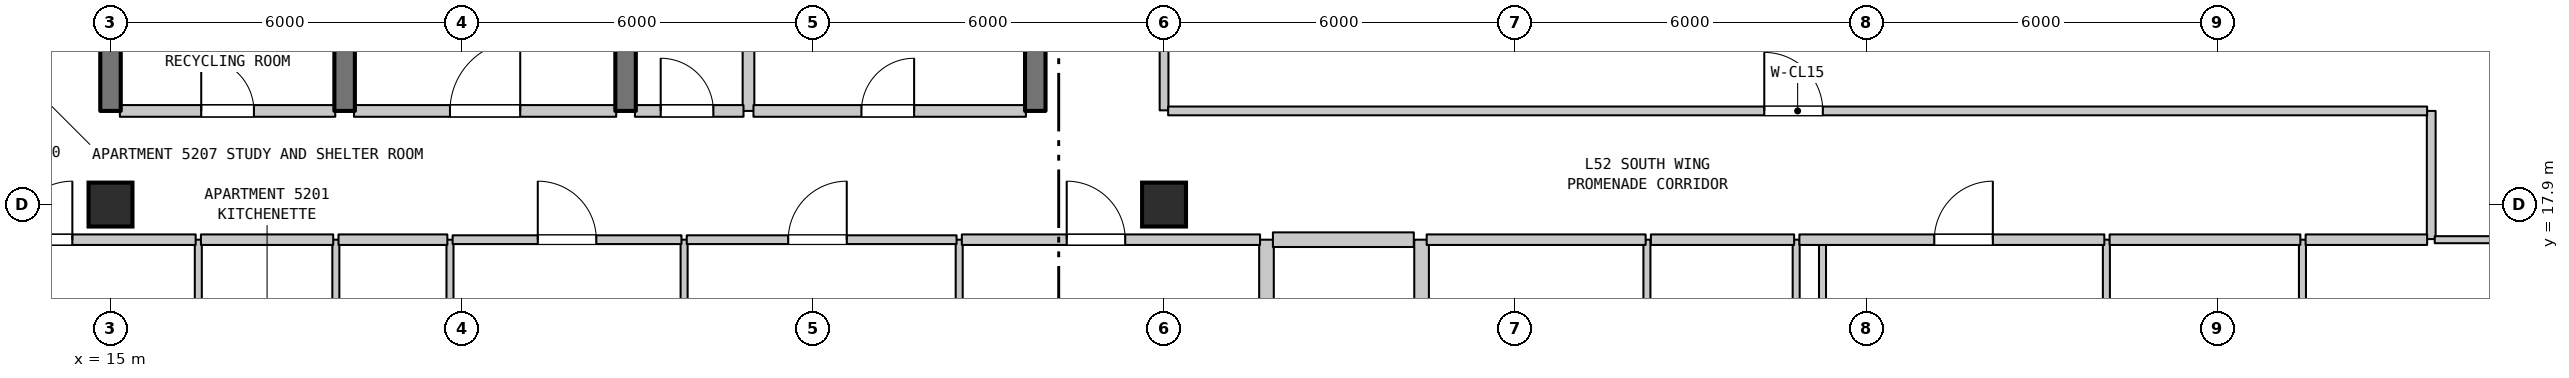
"""IFC4 building model, lengths in metres.
Left out: names, types, materials, properties, quantities, classifications, styles, units other than length and angle.
Written with IfcOpenShell. Run it as: python <this file> out.ifc"""

import sys

from ifc_helpers import new_model, si_unit, direction, frame, frame_2d, origin, origin_2d, place, context, subcontext, project, spatial, rectangle, extrude, element, fill, save


model = new_model("IFC4")
c1 = context("Model", 3, precision=1e-05, world=origin(), true_north=direction((0.0, 1.0)))
c2 = subcontext(c1, "Body", "Model", "MODEL_VIEW")
j1 = project(units=[si_unit("LENGTHUNIT", "METRE"), si_unit("PLANEANGLEUNIT", "RADIAN")], contexts=[c1])
p1 = place(None, origin())
s1 = spatial("IfcSite", under=j1, at=p1, CompositionType="ELEMENT")
p2 = place(p1, origin())
s2 = spatial("IfcBuilding", under=s1, at=p2, CompositionType="ELEMENT")
p3 = place(p2, frame((0.0, 0.0, 210.6)))
s3 = spatial("IfcBuildingStorey", under=s2, at=p3, CompositionType="ELEMENT", Elevation=210.6)
for number, where, z_axis, x_axis in (
    (1, (15.0, 17.9, 0.0), (0.0, 0.0, 1.0), (1.0, 0.0, 0.0)),
    (2, (33.0, 17.9, 0.0), (0.0, 0.0, 1.0), (1.0, 0.0, 0.0)),
):
    element("IfcColumn", number, at=place(p3, frame(where, z_axis=z_axis, x_axis=x_axis)), inside=s3, PredefinedType="COLUMN", context=c2, shape_type="SweptSolid", body=[
        extrude(rectangle(XDim=0.75, YDim=0.75, at=origin_2d()), origin(), (0.0, 0.0, 1.0), 3.7),
    ])
p4 = place(p3, frame((15.0, 19.5, 0.0), z_axis=(0.0, 0.0, 1.0), x_axis=(0.0, 1.0, 0.0)))
e3 = element("IfcWall", 3, at=p4, inside=s3, PredefinedType="SHEAR", context=c2, shape_type="SweptSolid", body=[
    extrude(rectangle(XDim=3.2, YDim=0.35, at=frame_2d((1.6, 0.0))), origin(), (0.0, 0.0, 1.0), 3.39),
])
p5 = place(p3, frame((16.5, 14.1, 0.0), z_axis=(0.0, 0.0, 1.0), x_axis=(0.0, 1.0, 0.0)))
e4 = element("IfcWall", 4, at=p5, inside=s3, PredefinedType="PARTITIONING", context=c2, shape_type="SweptSolid", body=[
    extrude(rectangle(XDim=3.2, YDim=0.12, at=frame_2d((1.6, 0.0))), origin(), (0.0, 0.0, 1.0), 3.39),
])
p6 = place(p5, frame((1.15, 0.0, 0.0)))
e5 = element("IfcOpeningElement", 5, at=p6, cuts=e4, PredefinedType="OPENING", context=c2, shape_type="SweptSolid", body=[
    extrude(rectangle(XDim=0.9, YDim=2.15, at=frame_2d((0.45, 1.075))), frame((0.0, 0.07, 0.0), z_axis=(0.0, -1.0, 0.0), x_axis=(1.0, 0.0, 0.0)), (0.0, 0.0, 1.0), 0.14),
])
p7 = place(p3, frame((18.85, 14.1, 0.0), z_axis=(0.0, 0.0, 1.0), x_axis=(0.0, 1.0, 0.0)))
e6 = element("IfcWall", 6, at=p7, inside=s3, PredefinedType="PARTITIONING", context=c2, shape_type="SweptSolid", body=[
    extrude(rectangle(XDim=3.2, YDim=0.12, at=frame_2d((1.6, 0.0))), origin(), (0.0, 0.0, 1.0), 3.39),
])
p8 = place(p3, frame((19.0, 19.5, 0.0), z_axis=(0.0, 0.0, 1.0), x_axis=(0.0, 1.0, 0.0)))
e7 = element("IfcWall", 7, at=p8, inside=s3, PredefinedType="SHEAR", context=c2, shape_type="SweptSolid", body=[
    extrude(rectangle(XDim=3.2, YDim=0.35, at=frame_2d((1.6, 0.0))), origin(), (0.0, 0.0, 1.0), 3.39),
])
p9 = place(p3, frame((20.8, 6.888, 0.0), z_axis=(0.0, 0.0, 1.0), x_axis=(0.0, 1.0, 0.0)))
e8 = element("IfcWall", 8, at=p9, inside=s3, PredefinedType="PARTITIONING", context=c2, shape_type="SweptSolid", body=[
    extrude(rectangle(XDim=10.412, YDim=0.12, at=frame_2d((5.206, 0.0))), origin(), (0.0, 0.0, 1.0), 3.39),
])
p10 = place(p3, frame((23.8, 19.5, 0.0), z_axis=(0.0, 0.0, 1.0), x_axis=(0.0, 1.0, 0.0)))
e9 = element("IfcWall", 9, at=p10, inside=s3, PredefinedType="SHEAR", context=c2, shape_type="SweptSolid", body=[
    extrude(rectangle(XDim=3.2, YDim=0.35, at=frame_2d((1.6, 0.0))), origin(), (0.0, 0.0, 1.0), 3.39),
])
p11 = place(p3, frame((24.8, 0.71, 0.0), z_axis=(0.0, 0.0, 1.0), x_axis=(0.0, 1.0, 0.0)))
e10 = element("IfcWall", 10, at=p11, inside=s3, PredefinedType="PARTITIONING", context=c2, shape_type="SweptSolid", body=[
    extrude(rectangle(XDim=16.59, YDim=0.12, at=frame_2d((8.295, 0.0))), origin(), (0.0, 0.0, 1.0), 3.39),
])
p12 = place(p3, frame((25.9, 19.5, 0.0), z_axis=(0.0, 0.0, 1.0), x_axis=(0.0, 1.0, 0.0)))
e11 = element("IfcWall", 11, at=p12, inside=s3, PredefinedType="STANDARD", context=c2, shape_type="SweptSolid", body=[
    extrude(rectangle(XDim=3.2, YDim=0.2, at=frame_2d((1.6, 0.0))), origin(), (0.0, 0.0, 1.0), 3.39),
])
p13 = place(p3, frame((29.5, 14.85, 0.0), z_axis=(0.0, 0.0, 1.0), x_axis=(0.0, 1.0, 0.0)))
e12 = element("IfcWall", 12, at=p13, inside=s3, PredefinedType="PARTITIONING", context=c2, shape_type="SweptSolid", body=[
    extrude(rectangle(XDim=2.45, YDim=0.12, at=frame_2d((1.225, 0.0))), origin(), (0.0, 0.0, 1.0), 3.39),
])
p14 = place(p3, frame((30.8, 19.5, 0.0), z_axis=(0.0, 0.0, 1.0), x_axis=(0.0, 1.0, 0.0)))
e13 = element("IfcWall", 13, at=p14, inside=s3, PredefinedType="SHEAR", context=c2, shape_type="SweptSolid", body=[
    extrude(rectangle(XDim=3.2, YDim=0.35, at=frame_2d((1.6, 0.0))), origin(), (0.0, 0.0, 1.0), 3.39),
])
p15 = place(p3, frame((33.0, 19.51, 0.0), z_axis=(0.0, 0.0, 1.0), x_axis=(0.0, 1.0, 0.0)))
e14 = element("IfcWall", 14, at=p15, inside=s3, PredefinedType="STANDARD", context=c2, shape_type="SweptSolid", body=[
    extrude(rectangle(XDim=3.66, YDim=0.15, at=frame_2d((1.83, 0.0))), origin(), (0.0, 0.0, 1.0), 2.99),
])
p16 = place(p15, frame((1.258, 0.0, 0.0)))
e15 = element("IfcOpeningElement", 15, at=p16, cuts=e14, PredefinedType="OPENING", context=c2, shape_type="SweptSolid", body=[
    extrude(rectangle(XDim=1.0, YDim=2.15, at=frame_2d((0.5, 1.075))), frame((0.0, 0.085, 0.0), z_axis=(0.0, -1.0, 0.0), x_axis=(1.0, 0.0, 0.0)), (0.0, 0.0, 1.0), 0.17),
])
for number, where, z_axis, x_axis in (
    (16, (34.75, 11.15, 0.0), (0.0, 0.0, 1.0), (0.0, 1.0, 0.0)),
    (17, (37.4, 11.15, 0.0), (0.0, 0.0, 1.0), (0.0, 1.0, 0.0)),
):
    element("IfcWall", number, at=place(p3, frame(where, z_axis=z_axis, x_axis=x_axis)), inside=s3, PredefinedType="STANDARD", context=c2, shape_type="SweptSolid", body=[
        extrude(rectangle(XDim=6.15, YDim=0.25, at=frame_2d((3.075, 0.0))), origin(), (0.0, 0.0, 1.0), 3.39),
    ])
for number, where, z_axis, x_axis in (
    (18, (41.25, 11.15, 0.0), (0.0, 0.0, 1.0), (0.0, 1.0, 0.0)),
    (19, (43.8, 11.15, 0.0), (0.0, 0.0, 1.0), (0.0, 1.0, 0.0)),
):
    element("IfcWall", number, at=place(p3, frame(where, z_axis=z_axis, x_axis=x_axis)), inside=s3, PredefinedType="PARTITIONING", context=c2, shape_type="SweptSolid", body=[
        extrude(rectangle(XDim=6.15, YDim=0.12, at=frame_2d((3.075, 0.0))), origin(), (0.0, 0.0, 1.0), 3.39),
    ])
p17 = place(p3, frame((44.25, 14.85, 0.0), z_axis=(0.0, 0.0, 1.0), x_axis=(0.0, 1.0, 0.0)))
e20 = element("IfcWall", 20, at=p17, inside=s3, PredefinedType="PARTITIONING", context=c2, shape_type="SweptSolid", body=[
    extrude(rectangle(XDim=2.45, YDim=0.12, at=frame_2d((1.225, 0.0))), origin(), (0.0, 0.0, 1.0), 3.39),
])
for number, where, z_axis, x_axis in (
    (21, (49.1, 11.15, 0.0), (0.0, 0.0, 1.0), (0.0, 1.0, 0.0)),
    (22, (52.45, 11.15, 0.0), (0.0, 0.0, 1.0), (0.0, 1.0, 0.0)),
):
    element("IfcWall", number, at=place(p3, frame(where, z_axis=z_axis, x_axis=x_axis)), inside=s3, PredefinedType="PARTITIONING", context=c2, shape_type="SweptSolid", body=[
        extrude(rectangle(XDim=6.15, YDim=0.12, at=frame_2d((3.075, 0.0))), origin(), (0.0, 0.0, 1.0), 3.39),
    ])
p18 = place(p3, frame((54.65, 17.31, 0.0), z_axis=(0.0, 0.0, 1.0), x_axis=(0.0, 1.0, 0.0)))
e23 = element("IfcWall", 23, at=p18, inside=s3, PredefinedType="STANDARD", context=c2, shape_type="SweptSolid", body=[
    extrude(rectangle(XDim=2.19, YDim=0.15, at=frame_2d((1.095, 0.0))), origin(), (0.0, 0.0, 1.0), 3.39),
])
p19 = place(p3, frame((12.875, 17.3, 0.0), z_axis=(0.0, 0.0, 1.0), x_axis=(1.0, 0.0, 0.0)))
e24 = element("IfcWall", 24, at=p19, inside=s3, PredefinedType="STANDARD", context=c2, shape_type="SweptSolid", body=[
    extrude(rectangle(XDim=3.58, YDim=0.18, at=frame_2d((1.79, 0.0))), origin(), (0.0, 0.0, 1.0), 3.39),
])
p20 = place(p19, frame((0.473, 0.0, 0.0)))
e25 = element("IfcOpeningElement", 25, at=p20, cuts=e24, PredefinedType="OPENING", context=c2, shape_type="SweptSolid", body=[
    extrude(rectangle(XDim=1.0, YDim=2.15, at=frame_2d((0.5, 1.075))), frame((0.0, 0.1, 0.0), z_axis=(0.0, -1.0, 0.0), x_axis=(1.0, 0.0, 0.0)), (0.0, 0.0, 1.0), 0.2),
])
p21 = place(p3, frame((16.545, 17.3, 0.0), z_axis=(0.0, 0.0, 1.0), x_axis=(1.0, 0.0, 0.0)))
e26 = element("IfcWall", 26, at=p21, inside=s3, PredefinedType="STANDARD", context=c2, shape_type="SweptSolid", body=[
    extrude(rectangle(XDim=2.26, YDim=0.18, at=frame_2d((1.13, 0.0))), origin(), (0.0, 0.0, 1.0), 3.39),
])
p22 = place(p3, frame((18.895, 17.3, 0.0), z_axis=(0.0, 0.0, 1.0), x_axis=(1.0, 0.0, 0.0)))
e27 = element("IfcWall", 27, at=p22, inside=s3, PredefinedType="STANDARD", context=c2, shape_type="SweptSolid", body=[
    extrude(rectangle(XDim=1.86, YDim=0.18, at=frame_2d((0.93, 0.0))), origin(), (0.0, 0.0, 1.0), 3.39),
])
p23 = place(p3, frame((20.845, 17.3, 0.0), z_axis=(0.0, 0.0, 1.0), x_axis=(1.0, 0.0, 0.0)))
e28 = element("IfcWall", 28, at=p23, inside=s3, PredefinedType="STANDARD", context=c2, shape_type="SweptSolid", body=[
    extrude(rectangle(XDim=3.91, YDim=0.15, at=frame_2d((1.955, 0.0))), origin(), (0.0, 0.0, 1.0), 3.39),
])
p24 = place(p23, frame((1.455, 0.0, 0.0)))
e29 = element("IfcOpeningElement", 29, at=p24, cuts=e28, PredefinedType="OPENING", context=c2, shape_type="SweptSolid", body=[
    extrude(rectangle(XDim=1.0, YDim=2.15, at=frame_2d((0.5, 1.075))), frame((0.0, 0.085, 0.0), z_axis=(0.0, -1.0, 0.0), x_axis=(1.0, 0.0, 0.0)), (0.0, 0.0, 1.0), 0.17),
])
p25 = place(p3, frame((24.845, 17.3, 0.0), z_axis=(0.0, 0.0, 1.0), x_axis=(1.0, 0.0, 0.0)))
e30 = element("IfcWall", 30, at=p25, inside=s3, PredefinedType="STANDARD", context=c2, shape_type="SweptSolid", body=[
    extrude(rectangle(XDim=4.61, YDim=0.15, at=frame_2d((2.305, 0.0))), origin(), (0.0, 0.0, 1.0), 3.39),
])
p26 = place(p25, frame((1.734, 0.0, 0.0)))
e31 = element("IfcOpeningElement", 31, at=p26, cuts=e30, PredefinedType="OPENING", context=c2, shape_type="SweptSolid", body=[
    extrude(rectangle(XDim=1.0, YDim=2.15, at=frame_2d((0.5, 1.075))), frame((0.0, 0.085, 0.0), z_axis=(0.0, -1.0, 0.0), x_axis=(1.0, 0.0, 0.0)), (0.0, 0.0, 1.0), 0.17),
])
p27 = place(p3, frame((29.545, 17.3, 0.0), z_axis=(0.0, 0.0, 1.0), x_axis=(1.0, 0.0, 0.0)))
e32 = element("IfcWall", 32, at=p27, inside=s3, PredefinedType="STANDARD", context=c2, shape_type="SweptSolid", body=[
    extrude(rectangle(XDim=5.095, YDim=0.18, at=frame_2d((2.547, 0.0))), origin(), (0.0, 0.0, 1.0), 3.39),
])
p28 = place(p27, frame((1.792, 0.0, 0.0)))
e33 = element("IfcOpeningElement", 33, at=p28, cuts=e32, PredefinedType="OPENING", context=c2, shape_type="SweptSolid", body=[
    extrude(rectangle(XDim=1.0, YDim=2.15, at=frame_2d((0.5, 1.075))), frame((0.0, 0.1, 0.0), z_axis=(0.0, -1.0, 0.0), x_axis=(1.0, 0.0, 0.0)), (0.0, 0.0, 1.0), 0.2),
])
p29 = place(p3, frame((34.86, 17.3, 0.0), z_axis=(0.0, 0.0, 1.0), x_axis=(1.0, 0.0, 0.0)))
e34 = element("IfcWall", 34, at=p29, inside=s3, PredefinedType="STANDARD", context=c2, shape_type="SweptSolid", body=[
    extrude(rectangle(XDim=2.407, YDim=0.25, at=frame_2d((1.204, 0.0))), origin(), (0.0, 0.0, 1.0), 3.39),
])
p30 = place(p3, frame((37.487, 17.3, 0.0), z_axis=(0.0, 0.0, 1.0), x_axis=(1.0, 0.0, 0.0)))
e35 = element("IfcWall", 35, at=p30, inside=s3, PredefinedType="STANDARD", context=c2, shape_type="SweptSolid", body=[
    extrude(rectangle(XDim=3.741, YDim=0.18, at=frame_2d((1.871, 0.0))), origin(), (0.0, 0.0, 1.0), 3.39),
])
p31 = place(p3, frame((41.318, 17.3, 0.0), z_axis=(0.0, 0.0, 1.0), x_axis=(1.0, 0.0, 0.0)))
e36 = element("IfcWall", 36, at=p31, inside=s3, PredefinedType="STANDARD", context=c2, shape_type="SweptSolid", body=[
    extrude(rectangle(XDim=2.447, YDim=0.18, at=frame_2d((1.223, 0.0))), origin(), (0.0, 0.0, 1.0), 3.39),
])
p32 = place(p3, frame((43.855, 17.3, 0.0), z_axis=(0.0, 0.0, 1.0), x_axis=(1.0, 0.0, 0.0)))
e37 = element("IfcWall", 37, at=p32, inside=s3, PredefinedType="STANDARD", context=c2, shape_type="SweptSolid", body=[
    extrude(rectangle(XDim=5.21, YDim=0.18, at=frame_2d((2.605, 0.0))), origin(), (0.0, 0.0, 1.0), 3.39),
])
p33 = place(p32, frame((2.305, 0.0, 0.0)))
e38 = element("IfcOpeningElement", 38, at=p33, cuts=e37, PredefinedType="OPENING", context=c2, shape_type="SweptSolid", body=[
    extrude(rectangle(XDim=1.0, YDim=2.15, at=frame_2d((0.5, 1.075))), frame((0.0, 0.1, 0.0), z_axis=(0.0, -1.0, 0.0), x_axis=(1.0, 0.0, 0.0)), (0.0, 0.0, 1.0), 0.2),
])
p34 = place(p3, frame((49.155, 17.3, 0.0), z_axis=(0.0, 0.0, 1.0), x_axis=(1.0, 0.0, 0.0)))
e39 = element("IfcWall", 39, at=p34, inside=s3, PredefinedType="STANDARD", context=c2, shape_type="SweptSolid", body=[
    extrude(rectangle(XDim=3.259, YDim=0.18, at=frame_2d((1.629, 0.0))), origin(), (0.0, 0.0, 1.0), 3.39),
])
p35 = place(p3, frame((52.504, 17.3, 0.0), z_axis=(0.0, 0.0, 1.0), x_axis=(1.0, 0.0, 0.0)))
e40 = element("IfcWall", 40, at=p35, inside=s3, PredefinedType="STANDARD", context=c2, shape_type="SweptSolid", body=[
    extrude(rectangle(XDim=2.076, YDim=0.18, at=frame_2d((1.038, 0.0))), origin(), (0.0, 0.0, 1.0), 3.39),
])
p36 = place(p3, frame((54.71, 17.3, 0.0), z_axis=(0.0, 0.0, 1.0), x_axis=(1.0, 0.0, 0.0)))
e41 = element("IfcWall", 41, at=p36, inside=s3, PredefinedType="PARTITIONING", context=c2, shape_type="SweptSolid", body=[
    extrude(rectangle(XDim=1.635, YDim=0.12, at=frame_2d((0.817, 0.0))), origin(), (0.0, 0.0, 1.0), 3.39),
])
p37 = place(p3, frame((15.16, 19.5, 0.0), z_axis=(0.0, 0.0, 1.0), x_axis=(1.0, 0.0, 0.0)))
e42 = element("IfcWall", 42, at=p37, inside=s3, PredefinedType="STANDARD", context=c2, shape_type="SweptSolid", body=[
    extrude(rectangle(XDim=3.68, YDim=0.2, at=frame_2d((1.84, 0.0))), origin(), (0.0, 0.0, 1.0), 3.39),
])
p38 = place(p37, frame((1.39, 0.0, 0.0)))
e43 = element("IfcOpeningElement", 43, at=p38, cuts=e42, PredefinedType="OPENING", context=c2, shape_type="SweptSolid", body=[
    extrude(rectangle(XDim=0.9, YDim=2.15, at=frame_2d((0.45, 1.075))), frame((0.0, 0.11, 0.0), z_axis=(0.0, -1.0, 0.0), x_axis=(1.0, 0.0, 0.0)), (0.0, 0.0, 1.0), 0.22),
])
p39 = place(p3, frame((19.16, 19.5, 0.0), z_axis=(0.0, 0.0, 1.0), x_axis=(1.0, 0.0, 0.0)))
e44 = element("IfcWall", 44, at=p39, inside=s3, PredefinedType="STANDARD", context=c2, shape_type="SweptSolid", body=[
    extrude(rectangle(XDim=4.48, YDim=0.2, at=frame_2d((2.24, 0.0))), origin(), (0.0, 0.0, 1.0), 3.39),
])
p40 = place(p39, frame((1.64, 0.0, 0.0)))
e45 = element("IfcOpeningElement", 45, at=p40, cuts=e44, PredefinedType="OPENING", context=c2, shape_type="SweptSolid", body=[
    extrude(rectangle(XDim=1.2, YDim=2.2, at=frame_2d((0.6, 1.1))), frame((0.0, 0.11, 0.0), z_axis=(0.0, -1.0, 0.0), x_axis=(1.0, 0.0, 0.0)), (0.0, 0.0, 1.0), 0.22),
])
p41 = place(p3, frame((23.96, 19.5, 0.0), z_axis=(0.0, 0.0, 1.0), x_axis=(1.0, 0.0, 0.0)))
e46 = element("IfcWall", 46, at=p41, inside=s3, PredefinedType="STANDARD", context=c2, shape_type="SweptSolid", body=[
    extrude(rectangle(XDim=1.855, YDim=0.2, at=frame_2d((0.927, 0.0))), origin(), (0.0, 0.0, 1.0), 3.39),
])
p42 = place(p41, frame((0.44, 0.0, 0.0)))
e47 = element("IfcOpeningElement", 47, at=p42, cuts=e46, PredefinedType="OPENING", context=c2, shape_type="SweptSolid", body=[
    extrude(rectangle(XDim=0.9, YDim=2.15, at=frame_2d((0.45, 1.075))), frame((0.0, 0.11, 0.0), z_axis=(0.0, -1.0, 0.0), x_axis=(1.0, 0.0, 0.0)), (0.0, 0.0, 1.0), 0.22),
])
p43 = place(p3, frame((25.985, 19.5, 0.0), z_axis=(0.0, 0.0, 1.0), x_axis=(1.0, 0.0, 0.0)))
e48 = element("IfcWall", 48, at=p43, inside=s3, PredefinedType="STANDARD", context=c2, shape_type="SweptSolid", body=[
    extrude(rectangle(XDim=4.655, YDim=0.2, at=frame_2d((2.327, 0.0))), origin(), (0.0, 0.0, 1.0), 3.39),
])
p44 = place(p43, frame((1.845, 0.0, 0.0)))
e49 = element("IfcOpeningElement", 49, at=p44, cuts=e48, PredefinedType="OPENING", context=c2, shape_type="SweptSolid", body=[
    extrude(rectangle(XDim=0.9, YDim=2.15, at=frame_2d((0.45, 1.075))), frame((0.0, 0.11, 0.0), z_axis=(0.0, -1.0, 0.0), x_axis=(1.0, 0.0, 0.0)), (0.0, 0.0, 1.0), 0.22),
])
p45 = place(p3, frame((33.07, 19.5, 0.0), z_axis=(0.0, 0.0, 1.0), x_axis=(1.0, 0.0, 0.0)))
e50 = element("IfcWall", 50, at=p45, inside=s3, PredefinedType="STANDARD", context=c2, shape_type="SweptSolid", body=[
    extrude(rectangle(XDim=21.51, YDim=0.15, at=frame_2d((10.755, 0.0))), origin(), (0.0, 0.0, 1.0), 3.39),
])
p46 = place(p45, frame((10.185, 0.0, 0.0)))
e51 = element("IfcOpeningElement", 51, at=p46, cuts=e50, PredefinedType="OPENING", context=c2, shape_type="SweptSolid", body=[
    extrude(rectangle(XDim=1.0, YDim=2.15, at=frame_2d((0.5, 1.075))), frame((0.0, 0.085, 0.0), z_axis=(0.0, -1.0, 0.0), x_axis=(1.0, 0.0, 0.0)), (0.0, 0.0, 1.0), 0.17),
])
p47 = place(p20, origin())
e52 = element("IfcDoor", 52, at=p47, inside=s3, OperationType="SINGLE_SWING_RIGHT", PredefinedType="DOOR", context=c2, shape_type="SweptSolid", body=[
    extrude(rectangle(XDim=1.0, YDim=2.15, at=frame_2d((0.5, 1.075))), frame((0.0, 0.025, 0.0), z_axis=(0.0, -1.0, 0.0), x_axis=(1.0, 0.0, 0.0)), (0.0, 0.0, 1.0), 0.05),
])
fill(e25, e52)
p48 = place(p24, origin())
e53 = element("IfcDoor", 53, at=p48, inside=s3, OperationType="SINGLE_SWING_LEFT", PredefinedType="DOOR", context=c2, shape_type="SweptSolid", body=[
    extrude(rectangle(XDim=1.0, YDim=2.15, at=frame_2d((0.5, 1.075))), frame((0.0, 0.025, 0.0), z_axis=(0.0, -1.0, 0.0), x_axis=(1.0, 0.0, 0.0)), (0.0, 0.0, 1.0), 0.05),
])
fill(e29, e53)
p49 = place(p26, origin())
e54 = element("IfcDoor", 54, at=p49, inside=s3, OperationType="SINGLE_SWING_RIGHT", PredefinedType="DOOR", context=c2, shape_type="SweptSolid", body=[
    extrude(rectangle(XDim=1.0, YDim=2.15, at=frame_2d((0.5, 1.075))), frame((0.0, 0.025, 0.0), z_axis=(0.0, -1.0, 0.0), x_axis=(1.0, 0.0, 0.0)), (0.0, 0.0, 1.0), 0.05),
])
fill(e31, e54)
p50 = place(p28, origin())
e55 = element("IfcDoor", 55, at=p50, inside=s3, OperationType="SINGLE_SWING_LEFT", PredefinedType="DOOR", context=c2, shape_type="SweptSolid", body=[
    extrude(rectangle(XDim=1.0, YDim=2.15, at=frame_2d((0.5, 1.075))), frame((0.0, 0.025, 0.0), z_axis=(0.0, -1.0, 0.0), x_axis=(1.0, 0.0, 0.0)), (0.0, 0.0, 1.0), 0.05),
])
fill(e33, e55)
p51 = place(p33, origin())
e56 = element("IfcDoor", 56, at=p51, inside=s3, OperationType="SINGLE_SWING_RIGHT", PredefinedType="DOOR", context=c2, shape_type="SweptSolid", body=[
    extrude(rectangle(XDim=1.0, YDim=2.15, at=frame_2d((0.5, 1.075))), frame((0.0, 0.025, 0.0), z_axis=(0.0, -1.0, 0.0), x_axis=(1.0, 0.0, 0.0)), (0.0, 0.0, 1.0), 0.05),
])
fill(e38, e56)
p52 = place(p38, origin())
e57 = element("IfcDoor", 57, at=p52, inside=s3, OperationType="SINGLE_SWING_LEFT", PredefinedType="DOOR", context=c2, shape_type="SweptSolid", body=[
    extrude(rectangle(XDim=0.9, YDim=2.15, at=frame_2d((0.45, 1.075))), frame((0.0, 0.025, 0.0), z_axis=(0.0, -1.0, 0.0), x_axis=(1.0, 0.0, 0.0)), (0.0, 0.0, 1.0), 0.05),
])
fill(e43, e57)
p53 = place(p40, origin())
e58 = element("IfcDoor", 58, at=p53, inside=s3, OperationType="SINGLE_SWING_RIGHT", PredefinedType="DOOR", context=c2, shape_type="SweptSolid", body=[
    extrude(rectangle(XDim=1.2, YDim=2.2, at=frame_2d((0.6, 1.1))), frame((0.0, 0.025, 0.0), z_axis=(0.0, -1.0, 0.0), x_axis=(1.0, 0.0, 0.0)), (0.0, 0.0, 1.0), 0.05),
])
fill(e45, e58)
p54 = place(p42, origin())
e59 = element("IfcDoor", 59, at=p54, inside=s3, OperationType="SINGLE_SWING_LEFT", PredefinedType="DOOR", context=c2, shape_type="SweptSolid", body=[
    extrude(rectangle(XDim=0.9, YDim=2.15, at=frame_2d((0.45, 1.075))), frame((0.0, 0.025, 0.0), z_axis=(0.0, -1.0, 0.0), x_axis=(1.0, 0.0, 0.0)), (0.0, 0.0, 1.0), 0.05),
])
fill(e47, e59)
p55 = place(p44, origin())
e60 = element("IfcDoor", 60, at=p55, inside=s3, OperationType="SINGLE_SWING_RIGHT", PredefinedType="DOOR", context=c2, shape_type="SweptSolid", body=[
    extrude(rectangle(XDim=0.9, YDim=2.15, at=frame_2d((0.45, 1.075))), frame((0.0, 0.025, 0.0), z_axis=(0.0, -1.0, 0.0), x_axis=(1.0, 0.0, 0.0)), (0.0, 0.0, 1.0), 0.05),
])
fill(e49, e60)
p56 = place(p46, origin())
e61 = element("IfcDoor", 61, at=p56, inside=s3, OperationType="SINGLE_SWING_LEFT", PredefinedType="DOOR", context=c2, shape_type="SweptSolid", body=[
    extrude(rectangle(XDim=1.0, YDim=2.15, at=frame_2d((0.5, 1.075))), frame((0.0, 0.025, 0.0), z_axis=(0.0, -1.0, 0.0), x_axis=(1.0, 0.0, 0.0)), (0.0, 0.0, 1.0), 0.05),
])
fill(e51, e61)
save(model, sys.argv[1])
